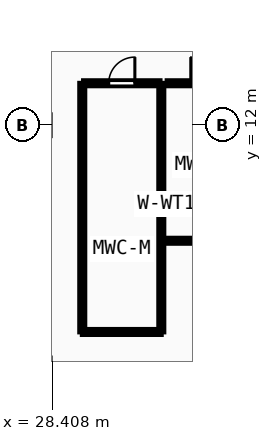
"""IFC4 building model, lengths in metres.
Left out: names, types, materials, properties, quantities, classifications, styles, units other than length and angle.
Written with IfcOpenShell. Run it as: python <this file> out.ifc"""

import sys

from ifc_helpers import new_model, si_unit, direction, frame, frame_2d, origin, place, context, subcontext, project, spatial, rectangle, extrude, element, fill, save


model = new_model("IFC4")
c1 = context("Model", 3, precision=1e-05, world=origin(), true_north=direction((0.0, 1.0)))
c2 = subcontext(c1, "Body", "Model", "MODEL_VIEW")
j1 = project(units=[si_unit("LENGTHUNIT", "METRE"), si_unit("PLANEANGLEUNIT", "RADIAN")], contexts=[c1])
p1 = place(None, origin())
s1 = spatial("IfcSite", under=j1, at=p1, CompositionType="ELEMENT")
p2 = place(p1, origin())
s2 = spatial("IfcBuilding", under=s1, at=p2, CompositionType="ELEMENT")
p3 = place(p2, frame((0.0, 0.0, 13.5)))
s3 = spatial("IfcBuildingStorey", under=s2, at=p3, CompositionType="ELEMENT", Elevation=13.5)
p4 = place(p3, frame((29.46, 13.38, 0.0), z_axis=(0.0, 0.0, 1.0), x_axis=(1.0, 0.0, 0.0)))
e1 = element("IfcWall", 1, at=p4, inside=s3, PredefinedType="PLUMBINGWALL", context=c2, shape_type="SweptSolid", body=[
    extrude(rectangle(XDim=2.48, YDim=0.13, at=frame_2d((1.24, 0.0))), origin(), (0.0, 0.0, 1.0), 4.09),
])
p5 = place(p4, frame((0.81, 0.0, 0.0)))
e2 = element("IfcOpeningElement", 2, at=p5, cuts=e1, PredefinedType="OPENING", context=c2, shape_type="SweptSolid", body=[
    extrude(rectangle(XDim=0.86, YDim=2.05, at=frame_2d((0.43, 1.025))), frame((0.0, 0.075, 0.0), z_axis=(0.0, -1.0, 0.0), x_axis=(1.0, 0.0, 0.0)), (0.0, 0.0, 1.0), 0.15),
])
p6 = place(p3, frame((32.21, 13.38, 0.0), z_axis=(0.0, 0.0, 1.0), x_axis=(1.0, 0.0, 0.0)))
e3 = element("IfcWall", 3, at=p6, inside=s3, PredefinedType="PLUMBINGWALL", context=c2, shape_type="SweptSolid", body=[
    extrude(rectangle(XDim=2.38, YDim=0.13, at=frame_2d((1.19, 0.0))), origin(), (0.0, 0.0, 1.0), 4.09),
])
p7 = place(p6, frame((0.76, 0.0, 0.0)))
e4 = element("IfcOpeningElement", 4, at=p7, cuts=e3, PredefinedType="OPENING", context=c2, shape_type="SweptSolid", body=[
    extrude(rectangle(XDim=0.86, YDim=2.05, at=frame_2d((0.43, 1.025))), frame((0.0, 0.075, 0.0), z_axis=(0.0, -1.0, 0.0), x_axis=(1.0, 0.0, 0.0)), (0.0, 0.0, 1.0), 0.15),
])
p8 = place(p3, frame((29.42, 5.2, 0.0), z_axis=(0.0, 0.0, 1.0), x_axis=(1.0, 0.0, 0.0)))
e5 = element("IfcWall", 5, at=p8, inside=s3, PredefinedType="PLUMBINGWALL", context=c2, shape_type="SweptSolid", body=[
    extrude(rectangle(XDim=2.56, YDim=0.13, at=frame_2d((1.28, 0.0))), origin(), (0.0, 0.0, 1.0), 4.09),
])
for number, where, z_axis, x_axis in (
    (6, (32.0, 5.22, 0.0), (0.0, 0.0, 1.0), (0.0, 1.0, 0.0)),
    (7, (29.4, 13.36, 0.0), (0.0, 0.0, 1.0), (0.0, -1.0, 0.0)),
):
    element("IfcWall", number, at=place(p3, frame(where, z_axis=z_axis, x_axis=x_axis)), inside=s3, PredefinedType="PLUMBINGWALL", context=c2, shape_type="SweptSolid", body=[
        extrude(rectangle(XDim=8.14, YDim=0.13, at=frame_2d((4.07, 0.0))), origin(), (0.0, 0.0, 1.0), 3.425),
    ])
p9 = place(p3, frame((32.17, 8.2, 0.0), z_axis=(0.0, 0.0, 1.0), x_axis=(1.0, 0.0, 0.0)))
e8 = element("IfcWall", 8, at=p9, inside=s3, PredefinedType="PLUMBINGWALL", context=c2, shape_type="SweptSolid", body=[
    extrude(rectangle(XDim=2.46, YDim=0.13, at=frame_2d((1.23, 0.0))), origin(), (0.0, 0.0, 1.0), 4.09),
])
p10 = place(p5, origin())
e9 = element("IfcDoor", 9, at=p10, inside=s3, OperationType="SINGLE_SWING_RIGHT", PredefinedType="DOOR", context=c2, shape_type="SweptSolid", body=[
    extrude(rectangle(XDim=0.86, YDim=2.05, at=frame_2d((0.43, 1.025))), frame((0.0, 0.025, 0.0), z_axis=(0.0, -1.0, 0.0), x_axis=(1.0, 0.0, 0.0)), (0.0, 0.0, 1.0), 0.05),
])
fill(e2, e9)
p11 = place(p7, origin())
e10 = element("IfcDoor", 10, at=p11, inside=s3, OperationType="SINGLE_SWING_LEFT", PredefinedType="DOOR", context=c2, shape_type="SweptSolid", body=[
    extrude(rectangle(XDim=0.86, YDim=2.05, at=frame_2d((0.43, 1.025))), frame((0.0, 0.025, 0.0), z_axis=(0.0, -1.0, 0.0), x_axis=(1.0, 0.0, 0.0)), (0.0, 0.0, 1.0), 0.05),
])
fill(e4, e10)
save(model, sys.argv[1])
